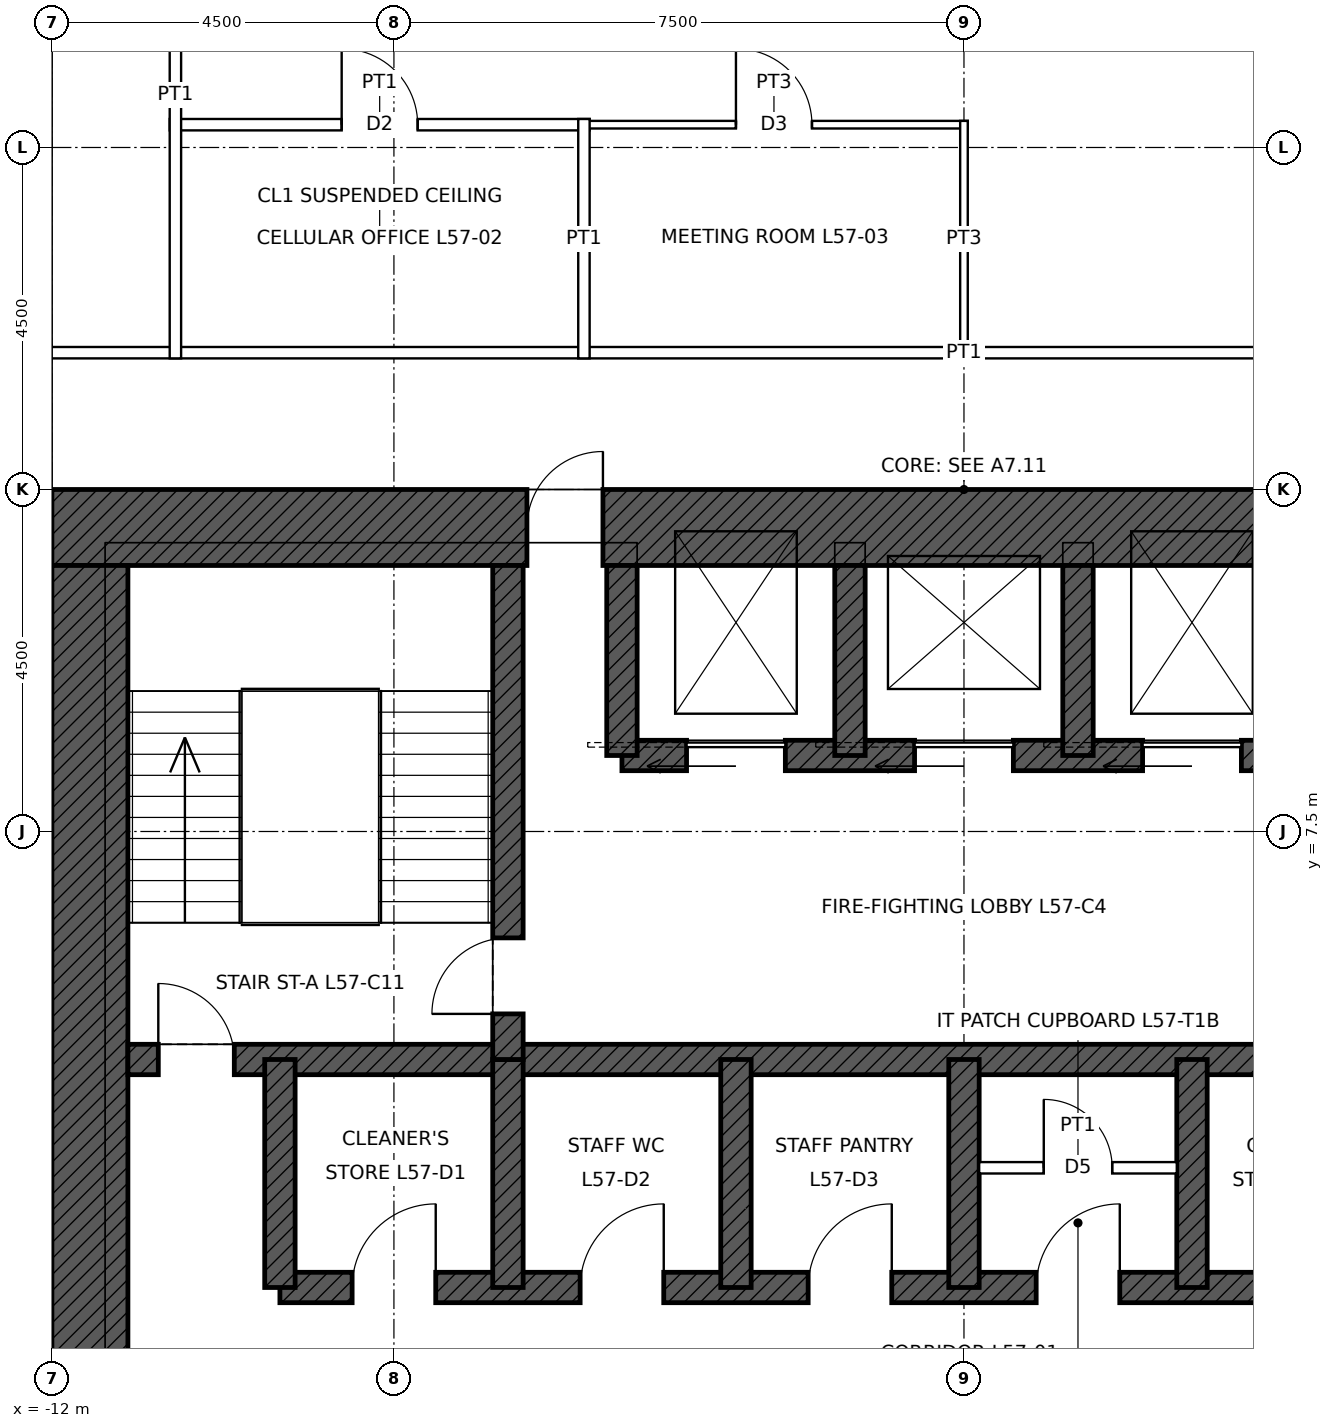
"""IFC4 building model, lengths in metres.
Left out: names, types, materials, properties, quantities, classifications, styles, units other than length and angle.
Written with IfcOpenShell. Run it as: python <this file> out.ifc"""

import sys

from ifc_helpers import new_model, si_unit, direction, frame, frame_2d, origin, place, context, subcontext, project, spatial, rectangle, extrude, element, fill, save


model = new_model("IFC4")
c1 = context("Model", 3, precision=1e-05, world=origin(), true_north=direction((0.0, 1.0)))
c2 = subcontext(c1, "Body", "Model", "MODEL_VIEW")
j1 = project(units=[si_unit("LENGTHUNIT", "METRE"), si_unit("PLANEANGLEUNIT", "RADIAN")], contexts=[c1])
p1 = place(None, origin())
s1 = spatial("IfcSite", under=j1, at=p1, CompositionType="ELEMENT")
p2 = place(p1, origin())
s2 = spatial("IfcBuilding", under=s1, at=p2, CompositionType="ELEMENT")
p3 = place(p2, frame((0.0, 0.0, 263.9)))
s3 = spatial("IfcBuildingStorey", under=s2, at=p3, CompositionType="ELEMENT", Elevation=263.9)
p4 = place(p3, frame((-12.0, 11.5, 0.0), z_axis=(0.0, 0.0, 1.0), x_axis=(1.0, 0.0, 0.0)))
e1 = element("IfcWall", 1, at=p4, inside=s3, PredefinedType="SHEAR", context=c2, shape_type="SweptSolid", body=[
    extrude(rectangle(XDim=24.0, YDim=1.0, at=frame_2d((12.0, 0.0))), origin(), (0.0, 0.0, 1.0), 4.0),
])
p5 = place(p4, frame((6.25, 0.0, 0.0)))
e2 = element("IfcOpeningElement", 2, at=p5, cuts=e1, PredefinedType="OPENING", context=c2, shape_type="SweptSolid", body=[
    extrude(rectangle(XDim=1.0, YDim=2.4, at=frame_2d((0.5, 1.2))), frame((0.0, 0.51, 0.0), z_axis=(0.0, -1.0, 0.0), x_axis=(1.0, 0.0, 0.0)), (0.0, 0.0, 1.0), 1.02),
])
p6 = place(p4, frame((16.75, 0.0, 0.0)))
e3 = element("IfcOpeningElement", 3, at=p6, cuts=e1, PredefinedType="OPENING", context=c2, shape_type="SweptSolid", body=[
    extrude(rectangle(XDim=1.0, YDim=2.4, at=frame_2d((0.5, 1.2))), frame((0.0, 0.51, 0.0), z_axis=(0.0, -1.0, 0.0), x_axis=(1.0, 0.0, 0.0)), (0.0, 0.0, 1.0), 1.02),
])
p7 = place(p3, frame((-11.5, -11.0, 0.0), z_axis=(0.0, 0.0, 1.0), x_axis=(0.0, 1.0, 0.0)))
e4 = element("IfcWall", 4, at=p7, inside=s3, PredefinedType="SHEAR", context=c2, shape_type="SweptSolid", body=[
    extrude(rectangle(XDim=22.0, YDim=1.0, at=frame_2d((11.0, 0.0))), origin(), (0.0, 0.0, 1.0), 4.0),
])
p8 = place(p7, frame((10.5, 0.0, 0.0)))
e5 = element("IfcOpeningElement", 5, at=p8, cuts=e4, PredefinedType="OPENING", context=c2, shape_type="SweptSolid", body=[
    extrude(rectangle(XDim=1.0, YDim=2.4, at=frame_2d((0.5, 1.2))), frame((0.0, 0.51, 0.0), z_axis=(0.0, -1.0, 0.0), x_axis=(1.0, 0.0, 0.0)), (0.0, 0.0, 1.0), 1.02),
])
p9 = place(p3, frame((-11.0, 4.5, 0.0), z_axis=(0.0, 0.0, 1.0), x_axis=(1.0, 0.0, 0.0)))
e6 = element("IfcWall", 6, at=p9, inside=s3, PredefinedType="SHEAR", context=c2, shape_type="SweptSolid", body=[
    extrude(rectangle(XDim=22.0, YDim=0.4, at=frame_2d((11.0, 0.0))), origin(), (0.0, 0.0, 1.0), 4.0),
])
p10 = place(p9, frame((0.4, 0.0, 0.0)))
e7 = element("IfcOpeningElement", 7, at=p10, cuts=e6, PredefinedType="OPENING", context=c2, shape_type="SweptSolid", body=[
    extrude(rectangle(XDim=1.0, YDim=2.1, at=frame_2d((0.5, 1.05))), frame((0.0, 0.21, 0.0), z_axis=(0.0, -1.0, 0.0), x_axis=(1.0, 0.0, 0.0)), (0.0, 0.0, 1.0), 0.42),
])
p11 = place(p9, frame((20.6, 0.0, 0.0)))
e8 = element("IfcOpeningElement", 8, at=p11, cuts=e6, PredefinedType="OPENING", context=c2, shape_type="SweptSolid", body=[
    extrude(rectangle(XDim=1.0, YDim=2.1, at=frame_2d((0.5, 1.05))), frame((0.0, 0.21, 0.0), z_axis=(0.0, -1.0, 0.0), x_axis=(1.0, 0.0, 0.0)), (0.0, 0.0, 1.0), 0.42),
])
p12 = place(p3, frame((-9.0, 1.5, 0.0), z_axis=(0.0, 0.0, 1.0), x_axis=(1.0, 0.0, 0.0)))
e9 = element("IfcWall", 9, at=p12, inside=s3, PredefinedType="SHEAR", context=c2, shape_type="SweptSolid", body=[
    extrude(rectangle(XDim=18.0, YDim=0.4, at=frame_2d((9.0, 0.0))), origin(), (0.0, 0.0, 1.0), 4.0),
])
p13 = place(p12, frame((0.95, 0.0, 0.0)))
e10 = element("IfcOpeningElement", 10, at=p13, cuts=e9, PredefinedType="OPENING", context=c2, shape_type="SweptSolid", body=[
    extrude(rectangle(XDim=1.1, YDim=2.1, at=frame_2d((0.55, 1.05))), frame((0.0, 0.21, 0.0), z_axis=(0.0, -1.0, 0.0), x_axis=(1.0, 0.0, 0.0)), (0.0, 0.0, 1.0), 0.42),
])
p14 = place(p12, frame((3.95, 0.0, 0.0)))
e11 = element("IfcOpeningElement", 11, at=p14, cuts=e9, PredefinedType="OPENING", context=c2, shape_type="SweptSolid", body=[
    extrude(rectangle(XDim=1.1, YDim=2.1, at=frame_2d((0.55, 1.05))), frame((0.0, 0.21, 0.0), z_axis=(0.0, -1.0, 0.0), x_axis=(1.0, 0.0, 0.0)), (0.0, 0.0, 1.0), 0.42),
])
p15 = place(p12, frame((6.95, 0.0, 0.0)))
e12 = element("IfcOpeningElement", 12, at=p15, cuts=e9, PredefinedType="OPENING", context=c2, shape_type="SweptSolid", body=[
    extrude(rectangle(XDim=1.1, YDim=2.1, at=frame_2d((0.55, 1.05))), frame((0.0, 0.21, 0.0), z_axis=(0.0, -1.0, 0.0), x_axis=(1.0, 0.0, 0.0)), (0.0, 0.0, 1.0), 0.42),
])
p16 = place(p12, frame((9.95, 0.0, 0.0)))
e13 = element("IfcOpeningElement", 13, at=p16, cuts=e9, PredefinedType="OPENING", context=c2, shape_type="SweptSolid", body=[
    extrude(rectangle(XDim=1.1, YDim=2.1, at=frame_2d((0.55, 1.05))), frame((0.0, 0.21, 0.0), z_axis=(0.0, -1.0, 0.0), x_axis=(1.0, 0.0, 0.0)), (0.0, 0.0, 1.0), 0.42),
])
p17 = place(p12, frame((12.95, 0.0, 0.0)))
e14 = element("IfcOpeningElement", 14, at=p17, cuts=e9, PredefinedType="OPENING", context=c2, shape_type="SweptSolid", body=[
    extrude(rectangle(XDim=1.1, YDim=2.1, at=frame_2d((0.55, 1.05))), frame((0.0, 0.21, 0.0), z_axis=(0.0, -1.0, 0.0), x_axis=(1.0, 0.0, 0.0)), (0.0, 0.0, 1.0), 0.42),
])
p18 = place(p12, frame((15.95, 0.0, 0.0)))
e15 = element("IfcOpeningElement", 15, at=p18, cuts=e9, PredefinedType="OPENING", context=c2, shape_type="SweptSolid", body=[
    extrude(rectangle(XDim=1.1, YDim=2.1, at=frame_2d((0.55, 1.05))), frame((0.0, 0.21, 0.0), z_axis=(0.0, -1.0, 0.0), x_axis=(1.0, 0.0, 0.0)), (0.0, 0.0, 1.0), 0.42),
])
p19 = place(p3, frame((-4.5, 8.5, 0.0), z_axis=(0.0, 0.0, 1.0), x_axis=(1.0, 0.0, 0.0)))
e16 = element("IfcWall", 16, at=p19, inside=s3, PredefinedType="SHEAR", context=c2, shape_type="SweptSolid", body=[
    extrude(rectangle(XDim=9.0, YDim=0.4, at=frame_2d((4.5, 0.0))), origin(), (0.0, 0.0, 1.0), 4.0),
])
p20 = place(p19, frame((0.85, 0.0, 0.0)))
e17 = element("IfcOpeningElement", 17, at=p20, cuts=e16, PredefinedType="OPENING", context=c2, shape_type="SweptSolid", body=[
    extrude(rectangle(XDim=1.3, YDim=2.4, at=frame_2d((0.65, 1.2))), frame((0.0, 0.21, 0.0), z_axis=(0.0, -1.0, 0.0), x_axis=(1.0, 0.0, 0.0)), (0.0, 0.0, 1.0), 0.42),
])
p21 = place(p19, frame((6.85, 0.0, 0.0)))
e18 = element("IfcOpeningElement", 18, at=p21, cuts=e16, PredefinedType="OPENING", context=c2, shape_type="SweptSolid", body=[
    extrude(rectangle(XDim=1.3, YDim=2.4, at=frame_2d((0.65, 1.2))), frame((0.0, 0.21, 0.0), z_axis=(0.0, -1.0, 0.0), x_axis=(1.0, 0.0, 0.0)), (0.0, 0.0, 1.0), 0.42),
])
p22 = place(p19, frame((3.85, 0.0, 0.0)))
e19 = element("IfcOpeningElement", 19, at=p22, cuts=e16, PredefinedType="OPENING", context=c2, shape_type="SweptSolid", body=[
    extrude(rectangle(XDim=1.3, YDim=2.4, at=frame_2d((0.65, 1.2))), frame((0.0, 0.21, 0.0), z_axis=(0.0, -1.0, 0.0), x_axis=(1.0, 0.0, 0.0)), (0.0, 0.0, 1.0), 0.42),
])
for number, where, z_axis, x_axis in (
    (20, (-9.0, 1.5, 0.0), (0.0, 0.0, 1.0), (0.0, 1.0, 0.0)),
    (21, (-6.0, 1.5, 0.0), (0.0, 0.0, 1.0), (0.0, 1.0, 0.0)),
    (22, (-3.0, 1.5, 0.0), (0.0, 0.0, 1.0), (0.0, 1.0, 0.0)),
    (23, (0.0, 1.5, 0.0), (0.0, 0.0, 1.0), (0.0, 1.0, 0.0)),
    (24, (3.0, 1.5, 0.0), (0.0, 0.0, 1.0), (0.0, 1.0, 0.0)),
):
    element("IfcWall", number, at=place(p3, frame(where, z_axis=z_axis, x_axis=x_axis)), inside=s3, PredefinedType="SHEAR", context=c2, shape_type="SweptSolid", body=[
        extrude(rectangle(XDim=3.0, YDim=0.4, at=frame_2d((1.5, 0.0))), origin(), (0.0, 0.0, 1.0), 4.0),
    ])
p23 = place(p3, frame((-6.0, 4.5, 0.0), z_axis=(0.0, 0.0, 1.0), x_axis=(0.0, 1.0, 0.0)))
e25 = element("IfcWall", 25, at=p23, inside=s3, PredefinedType="SHEAR", context=c2, shape_type="SweptSolid", body=[
    extrude(rectangle(XDim=6.5, YDim=0.4, at=frame_2d((3.25, 0.0))), origin(), (0.0, 0.0, 1.0), 4.0),
])
p24 = place(p23, frame((0.6, 0.0, 0.0)))
e26 = element("IfcOpeningElement", 26, at=p24, cuts=e25, PredefinedType="OPENING", context=c2, shape_type="SweptSolid", body=[
    extrude(rectangle(XDim=1.0, YDim=2.1, at=frame_2d((0.5, 1.05))), frame((0.0, 0.21, 0.0), z_axis=(0.0, -1.0, 0.0), x_axis=(1.0, 0.0, 0.0)), (0.0, 0.0, 1.0), 0.42),
])
for number, where, z_axis, x_axis in (
    (27, (-4.5, 8.5, 0.0), (0.0, 0.0, 1.0), (0.0, 1.0, 0.0)),
    (28, (-1.5, 8.5, 0.0), (0.0, 0.0, 1.0), (0.0, 1.0, 0.0)),
    (29, (1.5, 8.5, 0.0), (0.0, 0.0, 1.0), (0.0, 1.0, 0.0)),
):
    element("IfcWall", number, at=place(p3, frame(where, z_axis=z_axis, x_axis=x_axis)), inside=s3, PredefinedType="SHEAR", context=c2, shape_type="SweptSolid", body=[
        extrude(rectangle(XDim=2.5, YDim=0.4, at=frame_2d((1.25, 0.0))), origin(), (0.0, 0.0, 1.0), 4.0),
    ])
p25 = place(p3, frame((-13.875, 13.8, 0.0), z_axis=(0.0, 0.0, 1.0), x_axis=(1.0, 0.0, 0.0)))
e30 = element("IfcWall", 30, at=p25, inside=s3, PredefinedType="PARTITIONING", context=c2, shape_type="SweptSolid", body=[
    extrude(rectangle(XDim=27.75, YDim=0.15, at=frame_2d((13.875, 0.0))), origin(), (0.0, 0.0, 1.0), 3.85),
])
p26 = place(p25, frame((20.275, 0.0, 0.0)))
e31 = element("IfcOpeningElement", 31, at=p26, cuts=e30, PredefinedType="OPENING", context=c2, shape_type="SweptSolid", body=[
    extrude(rectangle(XDim=1.0, YDim=2.4, at=frame_2d((0.5, 1.2))), frame((0.0, 0.085, 0.0), z_axis=(0.0, -1.0, 0.0), x_axis=(1.0, 0.0, 0.0)), (0.0, 0.0, 1.0), 0.17),
])
p27 = place(p3, frame((-10.45, 16.8, 0.0), z_axis=(0.0, 0.0, 1.0), x_axis=(1.0, 0.0, 0.0)))
e32 = element("IfcWall", 32, at=p27, inside=s3, PredefinedType="PARTITIONING", context=c2, shape_type="SweptSolid", body=[
    extrude(rectangle(XDim=5.525, YDim=0.15, at=frame_2d((2.762, 0.0))), origin(), (0.0, 0.0, 1.0), 3.85),
])
p28 = place(p27, frame((2.262, 0.0, 0.0)))
e33 = element("IfcOpeningElement", 33, at=p28, cuts=e32, PredefinedType="OPENING", context=c2, shape_type="SweptSolid", body=[
    extrude(rectangle(XDim=1.0, YDim=2.1, at=frame_2d((0.5, 1.05))), frame((0.0, 0.085, 0.0), z_axis=(0.0, -1.0, 0.0), x_axis=(1.0, 0.0, 0.0)), (0.0, 0.0, 1.0), 0.17),
])
p29 = place(p3, frame((-5.05, 16.8, 0.0), z_axis=(0.0, 0.0, 1.0), x_axis=(1.0, 0.0, 0.0)))
e34 = element("IfcWall", 34, at=p29, inside=s3, PredefinedType="PARTITIONING", context=c2, shape_type="SweptSolid", body=[
    extrude(rectangle(XDim=5.1, YDim=0.1, at=frame_2d((2.55, 0.0))), origin(), (0.0, 0.0, 1.0), 3.85),
])
p30 = place(p29, frame((2.05, 0.0, 0.0)))
e35 = element("IfcOpeningElement", 35, at=p30, cuts=e34, PredefinedType="OPENING", context=c2, shape_type="SweptSolid", body=[
    extrude(rectangle(XDim=1.0, YDim=2.1, at=frame_2d((0.5, 1.05))), frame((0.0, 0.06, 0.0), z_axis=(0.0, -1.0, 0.0), x_axis=(1.0, 0.0, 0.0)), (0.0, 0.0, 1.0), 0.12),
])
p31 = place(p3, frame((-10.375, 13.725, 0.0), z_axis=(0.0, 0.0, 1.0), x_axis=(0.0, 1.0, 0.0)))
e36 = element("IfcWall", 36, at=p31, inside=s3, PredefinedType="PARTITIONING", context=c2, shape_type="SweptSolid", body=[
    extrude(rectangle(XDim=6.925, YDim=0.15, at=frame_2d((3.462, 0.0))), origin(), (0.0, 0.0, 1.0), 3.85),
])
p32 = place(p3, frame((-5.0, 13.725, 0.0), z_axis=(0.0, 0.0, 1.0), x_axis=(0.0, 1.0, 0.0)))
e37 = element("IfcWall", 37, at=p32, inside=s3, PredefinedType="PARTITIONING", context=c2, shape_type="SweptSolid", body=[
    extrude(rectangle(XDim=3.15, YDim=0.15, at=frame_2d((1.575, 0.0))), origin(), (0.0, 0.0, 1.0), 3.85),
])
p33 = place(p3, frame((0.0, 13.75, 0.0), z_axis=(0.0, 0.0, 1.0), x_axis=(0.0, 1.0, 0.0)))
e38 = element("IfcWall", 38, at=p33, inside=s3, PredefinedType="PARTITIONING", context=c2, shape_type="SweptSolid", body=[
    extrude(rectangle(XDim=3.1, YDim=0.1, at=frame_2d((1.55, 0.0))), origin(), (0.0, 0.0, 1.0), 3.243),
])
p34 = place(p3, frame((0.2, 3.075, 0.0), z_axis=(0.0, 0.0, 1.0), x_axis=(1.0, 0.0, 0.0)))
e39 = element("IfcWall", 39, at=p34, inside=s3, PredefinedType="PARTITIONING", context=c2, shape_type="SweptSolid", body=[
    extrude(rectangle(XDim=2.6, YDim=0.15, at=frame_2d((1.3, 0.0))), origin(), (0.0, 0.0, 1.0), 3.75),
])
p35 = place(p34, frame((0.85, 0.0, 0.0)))
e40 = element("IfcOpeningElement", 40, at=p35, cuts=e39, PredefinedType="OPENING", context=c2, shape_type="SweptSolid", body=[
    extrude(rectangle(XDim=0.9, YDim=2.1, at=frame_2d((0.45, 1.05))), frame((0.0, 0.085, 0.0), z_axis=(0.0, -1.0, 0.0), x_axis=(1.0, 0.0, 0.0)), (0.0, 0.0, 1.0), 0.17),
])
p36 = place(p10, origin())
e41 = element("IfcDoor", 41, at=p36, inside=s3, OperationType="SINGLE_SWING_LEFT", PredefinedType="DOOR", context=c2, shape_type="SweptSolid", body=[
    extrude(rectangle(XDim=1.0, YDim=2.1, at=frame_2d((0.5, 1.05))), frame((0.0, 0.025, 0.0), z_axis=(0.0, -1.0, 0.0), x_axis=(1.0, 0.0, 0.0)), (0.0, 0.0, 1.0), 0.05),
])
fill(e7, e41)
p37 = place(p24, origin())
e42 = element("IfcDoor", 42, at=p37, inside=s3, OperationType="SINGLE_SWING_LEFT", PredefinedType="DOOR", context=c2, shape_type="SweptSolid", body=[
    extrude(rectangle(XDim=1.0, YDim=2.1, at=frame_2d((0.5, 1.05))), frame((0.0, 0.025, 0.0), z_axis=(0.0, -1.0, 0.0), x_axis=(1.0, 0.0, 0.0)), (0.0, 0.0, 1.0), 0.05),
])
fill(e26, e42)
p38 = place(p5, origin())
e43 = element("IfcDoor", 43, at=p38, inside=s3, OperationType="SINGLE_SWING_RIGHT", PredefinedType="DOOR", context=c2, shape_type="SweptSolid", body=[
    extrude(rectangle(XDim=1.0, YDim=2.4, at=frame_2d((0.5, 1.2))), frame((0.0, 0.485, 0.0), z_axis=(0.0, -1.0, 0.0), x_axis=(1.0, 0.0, 0.0)), (0.0, 0.0, 1.0), 0.05),
])
fill(e2, e43)
p39 = place(p20, origin())
e44 = element("IfcDoor", 44, at=p39, inside=s3, OperationType="SLIDING_TO_LEFT", PredefinedType="DOOR", context=c2, shape_type="SweptSolid", body=[
    extrude(rectangle(XDim=1.3, YDim=2.4, at=frame_2d((0.65, 1.2))), frame((0.0, 0.025, 0.0), z_axis=(0.0, -1.0, 0.0), x_axis=(1.0, 0.0, 0.0)), (0.0, 0.0, 1.0), 0.05),
])
fill(e17, e44)
p40 = place(p21, origin())
e45 = element("IfcDoor", 45, at=p40, inside=s3, OperationType="SLIDING_TO_LEFT", PredefinedType="DOOR", context=c2, shape_type="SweptSolid", body=[
    extrude(rectangle(XDim=1.3, YDim=2.4, at=frame_2d((0.65, 1.2))), frame((0.0, 0.025, 0.0), z_axis=(0.0, -1.0, 0.0), x_axis=(1.0, 0.0, 0.0)), (0.0, 0.0, 1.0), 0.05),
])
fill(e18, e45)
p41 = place(p22, origin())
e46 = element("IfcDoor", 46, at=p41, inside=s3, OperationType="SLIDING_TO_LEFT", PredefinedType="DOOR", context=c2, shape_type="SweptSolid", body=[
    extrude(rectangle(XDim=1.3, YDim=2.4, at=frame_2d((0.65, 1.2))), frame((0.0, 0.025, 0.0), z_axis=(0.0, -1.0, 0.0), x_axis=(1.0, 0.0, 0.0)), (0.0, 0.0, 1.0), 0.05),
])
fill(e19, e46)
p42 = place(p13, origin())
e47 = element("IfcDoor", 47, at=p42, inside=s3, OperationType="SINGLE_SWING_RIGHT", PredefinedType="DOOR", context=c2, shape_type="SweptSolid", body=[
    extrude(rectangle(XDim=1.1, YDim=2.1, at=frame_2d((0.55, 1.05))), frame((0.0, 0.025, 0.0), z_axis=(0.0, -1.0, 0.0), x_axis=(1.0, 0.0, 0.0)), (0.0, 0.0, 1.0), 0.05),
])
fill(e10, e47)
p43 = place(p14, origin())
e48 = element("IfcDoor", 48, at=p43, inside=s3, OperationType="SINGLE_SWING_RIGHT", PredefinedType="DOOR", context=c2, shape_type="SweptSolid", body=[
    extrude(rectangle(XDim=1.1, YDim=2.1, at=frame_2d((0.55, 1.05))), frame((0.0, 0.025, 0.0), z_axis=(0.0, -1.0, 0.0), x_axis=(1.0, 0.0, 0.0)), (0.0, 0.0, 1.0), 0.05),
])
fill(e11, e48)
p44 = place(p15, origin())
e49 = element("IfcDoor", 49, at=p44, inside=s3, OperationType="SINGLE_SWING_RIGHT", PredefinedType="DOOR", context=c2, shape_type="SweptSolid", body=[
    extrude(rectangle(XDim=1.1, YDim=2.1, at=frame_2d((0.55, 1.05))), frame((0.0, 0.025, 0.0), z_axis=(0.0, -1.0, 0.0), x_axis=(1.0, 0.0, 0.0)), (0.0, 0.0, 1.0), 0.05),
])
fill(e12, e49)
p45 = place(p16, origin())
e50 = element("IfcDoor", 50, at=p45, inside=s3, OperationType="SINGLE_SWING_RIGHT", PredefinedType="DOOR", context=c2, shape_type="SweptSolid", body=[
    extrude(rectangle(XDim=1.1, YDim=2.1, at=frame_2d((0.55, 1.05))), frame((0.0, 0.025, 0.0), z_axis=(0.0, -1.0, 0.0), x_axis=(1.0, 0.0, 0.0)), (0.0, 0.0, 1.0), 0.05),
])
fill(e13, e50)
p46 = place(p35, origin())
e51 = element("IfcDoor", 51, at=p46, inside=s3, OperationType="SINGLE_SWING_LEFT", PredefinedType="DOOR", context=c2, shape_type="SweptSolid", body=[
    extrude(rectangle(XDim=0.9, YDim=2.1, at=frame_2d((0.45, 1.05))), frame((0.0, 0.025, 0.0), z_axis=(0.0, -1.0, 0.0), x_axis=(1.0, 0.0, 0.0)), (0.0, 0.0, 1.0), 0.05),
])
fill(e40, e51)
p47 = place(p28, origin())
e52 = element("IfcDoor", 52, at=p47, inside=s3, OperationType="SINGLE_SWING_LEFT", PredefinedType="DOOR", context=c2, shape_type="SweptSolid", body=[
    extrude(rectangle(XDim=1.0, YDim=2.1, at=frame_2d((0.5, 1.05))), frame((0.0, 0.025, 0.0), z_axis=(0.0, -1.0, 0.0), x_axis=(1.0, 0.0, 0.0)), (0.0, 0.0, 1.0), 0.05),
])
fill(e33, e52)
p48 = place(p30, origin())
e53 = element("IfcDoor", 53, at=p48, inside=s3, OperationType="SINGLE_SWING_LEFT", PredefinedType="DOOR", context=c2, shape_type="SweptSolid", body=[
    extrude(rectangle(XDim=1.0, YDim=2.1, at=frame_2d((0.5, 1.05))), frame((0.0, 0.025, 0.0), z_axis=(0.0, -1.0, 0.0), x_axis=(1.0, 0.0, 0.0)), (0.0, 0.0, 1.0), 0.05),
])
fill(e35, e53)
save(model, sys.argv[1])
